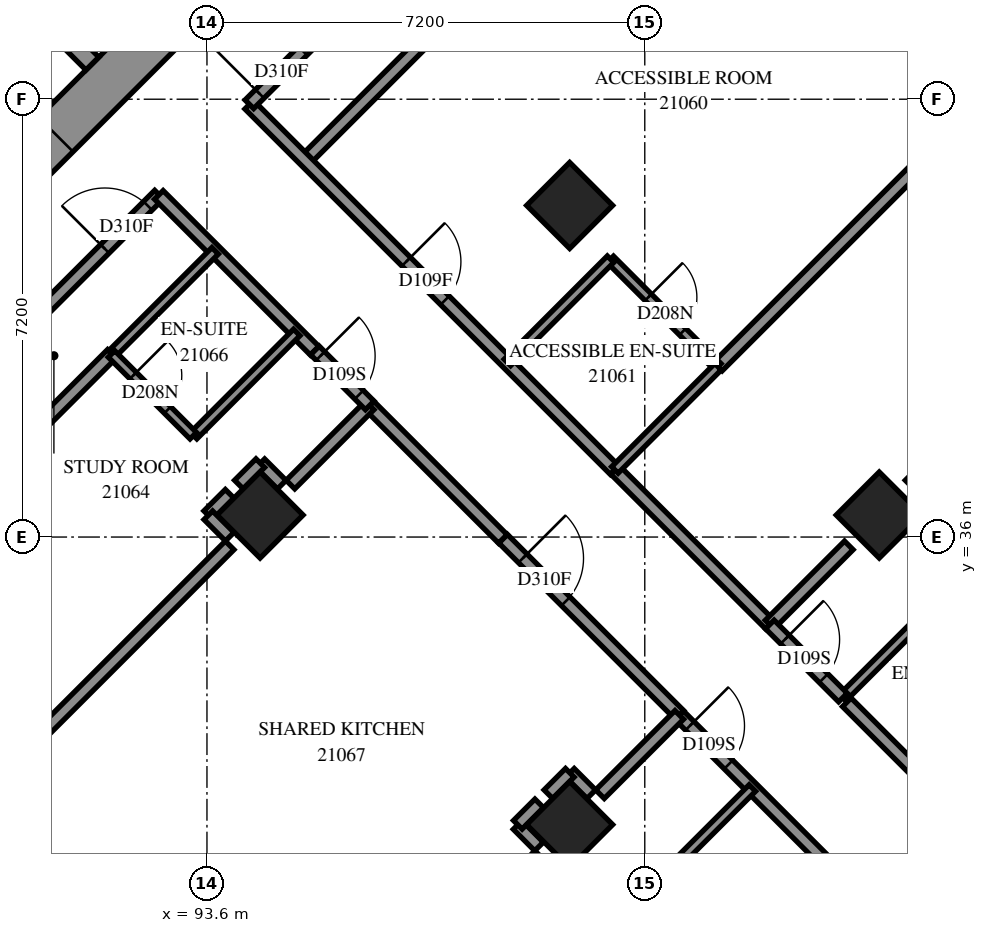
"""IFC4 building model, lengths in metres.
Left out: names, types, materials, properties, quantities, classifications, styles, units other than length and angle.
Written with IfcOpenShell. Run it as: python <this file> out.ifc"""

import sys

from ifc_helpers import new_model, si_unit, direction, frame, frame_2d, origin, origin_2d, place, context, subcontext, project, spatial, rectangle, extrude, element, fill, save


model = new_model("IFC4")
c1 = context("Model", 3, precision=1e-05, world=origin(), true_north=direction((0.0, 1.0)))
c2 = subcontext(c1, "Body", "Model", "MODEL_VIEW")
j1 = project(units=[si_unit("LENGTHUNIT", "METRE"), si_unit("PLANEANGLEUNIT", "RADIAN")], contexts=[c1])
p1 = place(None, origin())
s1 = spatial("IfcSite", under=j1, at=p1, CompositionType="ELEMENT")
p2 = place(p1, origin())
s2 = spatial("IfcBuilding", under=s1, at=p2, CompositionType="ELEMENT")
p3 = place(p2, frame((0.0, 0.0, 81.2)))
s3 = spatial("IfcBuildingStorey", under=s2, at=p3, CompositionType="ELEMENT", Elevation=81.2)
for number, where, z_axis, x_axis in (
    (1, (99.565, 41.453, 0.0), (0.0, 0.0, 1.0), (0.707, -0.707, 0.0)),
    (2, (94.474, 36.362, 0.0), (0.0, 0.0, 1.0), (0.707, -0.707, 0.0)),
    (3, (104.656, 36.362, 0.0), (0.0, 0.0, 1.0), (0.707, -0.707, 0.0)),
    (4, (99.565, 31.271, 0.0), (0.0, 0.0, 1.0), (0.707, -0.707, 0.0)),
):
    element("IfcColumn", number, at=place(p3, frame(where, z_axis=z_axis, x_axis=x_axis)), inside=s3, PredefinedType="COLUMN", context=c2, shape_type="SweptSolid", body=[
        extrude(rectangle(XDim=1.0, YDim=1.0, at=origin_2d()), origin(), (0.0, 0.0, 1.0), 3.1),
    ])
p4 = place(p3, frame((87.12, 38.625, -0.3), z_axis=(0.0, 0.0, 1.0), x_axis=(0.7071067812, 0.7071067812, 0.0)))
e5 = element("IfcWall", 5, at=p4, inside=s3, PredefinedType="SHEAR", context=c2, shape_type="SweptSolid", body=[
    extrude(rectangle(XDim=14.4, YDim=0.8, at=frame_2d((7.2, 0.0))), origin(), (0.0, 0.0, 1.0), 2.7),
])
p5 = place(p4, frame((4.55, 0.0, 0.3)))
e6 = element("IfcOpeningElement", 6, at=p5, cuts=e5, PredefinedType="OPENING", context=c2, shape_type="SweptSolid", body=[
    extrude(rectangle(XDim=1.1, YDim=2.1, at=frame_2d((0.55, 1.05))), frame((0.0, 0.41, 0.0), z_axis=(0.0, -1.0, 0.0), x_axis=(1.0, 0.0, 0.0)), (0.0, 0.0, 1.0), 0.82),
])
p6 = place(p4, frame((11.35, 0.0, 0.3)))
e7 = element("IfcOpeningElement", 7, at=p6, cuts=e5, PredefinedType="OPENING", context=c2, shape_type="SweptSolid", body=[
    extrude(rectangle(XDim=1.1, YDim=2.1, at=frame_2d((0.55, 1.05))), frame((0.0, 0.41, 0.0), z_axis=(0.0, -1.0, 0.0), x_axis=(1.0, 0.0, 0.0)), (0.0, 0.0, 1.0), 0.82),
])
p7 = place(p3, frame((81.534, 53.969, 0.0), z_axis=(0.0, 0.0, 1.0), x_axis=(0.707103309, -0.7071102534, 0.0)))
e8 = element("IfcWall", 8, at=p7, inside=s3, PredefinedType="SOLIDWALL", context=c2, shape_type="SweptSolid", body=[
    extrude(rectangle(XDim=14.4, YDim=0.3, at=frame_2d((7.2, 0.0))), origin(), (0.0, 0.0, 1.0), 3.1),
])
p8 = place(p7, frame((12.05, 0.0, 0.0)))
e9 = element("IfcOpeningElement", 9, at=p8, cuts=e8, PredefinedType="OPENING", context=c2, shape_type="SweptSolid", body=[
    extrude(rectangle(XDim=1.1, YDim=2.1, at=frame_2d((0.55, 1.05))), frame((0.0, 0.16, 0.0), z_axis=(0.0, -1.0, 0.0), x_axis=(1.0, 0.0, 0.0)), (0.0, 0.0, 1.0), 0.32),
])
p9 = place(p3, frame((95.215, 42.197, 0.0), z_axis=(0.0, 0.0, 1.0), x_axis=(0.7071114855, 0.7071020769, 0.0)))
e10 = element("IfcWall", 10, at=p9, inside=s3, PredefinedType="PARTITIONING", context=c2, shape_type="SweptSolid", body=[
    extrude(rectangle(XDim=10.629, YDim=0.2, at=frame_2d((5.314, 0.0))), origin(), (0.0, 0.0, 1.0), 3.1),
])
p10 = place(p3, frame((94.294, 43.111, 0.0), z_axis=(0.0, 0.0, 1.0), x_axis=(0.7071067812, -0.7071067812, 0.0)))
e11 = element("IfcWall", 11, at=p10, inside=s3, PredefinedType="PARTITIONING", context=c2, shape_type="SweptSolid", body=[
    extrude(rectangle(XDim=8.499, YDim=0.2, at=frame_2d((4.25, 0.0))), origin(), (0.0, 0.0, 1.0), 3.1),
])
p11 = place(p10, frame((3.651, 0.0, 0.0)))
e12 = element("IfcOpeningElement", 12, at=p11, cuts=e11, PredefinedType="OPENING", context=c2, shape_type="SweptSolid", body=[
    extrude(rectangle(XDim=0.9, YDim=2.1, at=frame_2d((0.45, 1.05))), frame((0.0, 0.11, 0.0), z_axis=(0.0, -1.0, 0.0), x_axis=(1.0, 0.0, 0.0)), (0.0, 0.0, 1.0), 0.22),
])
p12 = place(p3, frame((86.835, 35.655, 0.0), z_axis=(0.0, 0.0, 1.0), x_axis=(0.7071067812, 0.7071067812, 0.0)))
e13 = element("IfcWall", 13, at=p12, inside=s3, PredefinedType="PARTITIONING", context=c2, shape_type="SweptSolid", body=[
    extrude(rectangle(XDim=8.451, YDim=0.2, at=frame_2d((4.226, 0.0))), origin(), (0.0, 0.0, 1.0), 3.1),
])
p13 = place(p12, frame((7.192, 0.0, 0.0)))
e14 = element("IfcOpeningElement", 14, at=p13, cuts=e13, PredefinedType="OPENING", context=c2, shape_type="SweptSolid", body=[
    extrude(rectangle(XDim=1.0, YDim=2.1, at=frame_2d((0.5, 1.05))), frame((0.0, 0.11, 0.0), z_axis=(0.0, -1.0, 0.0), x_axis=(1.0, 0.0, 0.0)), (0.0, 0.0, 1.0), 0.22),
])
p14 = place(p3, frame((94.297, 43.117, 0.0), z_axis=(0.0, 0.0, 1.0), x_axis=(0.7071067812, 0.7071067812, 0.0)))
e15 = element("IfcWall", 15, at=p14, inside=s3, PredefinedType="PARTITIONING", context=c2, shape_type="SweptSolid", body=[
    extrude(rectangle(XDim=8.448, YDim=0.2, at=frame_2d((4.224, 0.0))), origin(), (0.0, 0.0, 1.0), 3.1),
])
p15 = place(p14, frame((0.242, 0.0, 0.0)))
e16 = element("IfcOpeningElement", 16, at=p15, cuts=e15, PredefinedType="OPENING", context=c2, shape_type="SweptSolid", body=[
    extrude(rectangle(XDim=1.0, YDim=2.1, at=frame_2d((0.5, 1.05))), frame((0.0, 0.11, 0.0), z_axis=(0.0, -1.0, 0.0), x_axis=(1.0, 0.0, 0.0)), (0.0, 0.0, 1.0), 0.22),
])
p16 = place(p3, frame((102.002, 38.804, 0.0), z_axis=(0.0, 0.0, 1.0), x_axis=(0.7072398927, 0.7069736446, 0.0)))
e17 = element("IfcWall", 17, at=p16, inside=s3, PredefinedType="PARTITIONING", context=c2, shape_type="SweptSolid", body=[
    extrude(rectangle(XDim=8.263, YDim=0.2, at=frame_2d((4.131, 0.0))), origin(), (0.0, 0.0, 1.0), 3.1),
])
p17 = place(p3, frame((86.351, 33.325, 0.0), z_axis=(0.0, 0.0, 1.0), x_axis=(0.7069824066, 0.7072311339, 0.0)))
e18 = element("IfcWall", 18, at=p17, inside=s3, PredefinedType="PARTITIONING", context=c2, shape_type="SweptSolid", body=[
    extrude(rectangle(XDim=8.041, YDim=0.2, at=frame_2d((4.021, 0.0))), origin(), (0.0, 0.0, 1.0), 3.1),
])
p18 = place(p3, frame((101.365, 33.071, 0.0), z_axis=(0.0, 0.0, 1.0), x_axis=(0.7071067812, -0.7071067812, 0.0)))
e19 = element("IfcWall", 19, at=p18, inside=s3, PredefinedType="PARTITIONING", context=c2, shape_type="SweptSolid", body=[
    extrude(rectangle(XDim=7.2, YDim=0.2, at=frame_2d((3.6, 0.0))), origin(), (0.0, 0.0, 1.0), 3.1),
])
p19 = place(p18, frame((0.248, 0.0, 0.0)))
e20 = element("IfcOpeningElement", 20, at=p19, cuts=e19, PredefinedType="OPENING", context=c2, shape_type="SweptSolid", body=[
    extrude(rectangle(XDim=0.9, YDim=2.1, at=frame_2d((0.45, 1.05))), frame((0.0, 0.11, 0.0), z_axis=(0.0, -1.0, 0.0), x_axis=(1.0, 0.0, 0.0)), (0.0, 0.0, 1.0), 0.22),
])
p20 = place(p18, frame((5.95, 0.0, 0.0)))
e21 = element("IfcOpeningElement", 21, at=p20, cuts=e19, PredefinedType="OPENING", context=c2, shape_type="SweptSolid", body=[
    extrude(rectangle(XDim=0.9, YDim=2.1, at=frame_2d((0.45, 1.05))), frame((0.0, 0.11, 0.0), z_axis=(0.0, -1.0, 0.0), x_axis=(1.0, 0.0, 0.0)), (0.0, 0.0, 1.0), 0.22),
])
for number, where, z_axis, x_axis in (
    (22, (89.881, 31.771, 0.0), (0.0, 0.0, 1.0), (0.707, 0.707, 0.0)),
    (23, (105.155, 36.863, 0.0), (0.0, 0.0, 1.0), (0.707, 0.707, 0.0)),
):
    element("IfcWall", number, at=place(p3, frame(where, z_axis=z_axis, x_axis=x_axis)), inside=s3, PredefinedType="PARTITIONING", context=c2, shape_type="SweptSolid", body=[
        extrude(rectangle(XDim=5.787, YDim=0.2, at=frame_2d((2.893, 0.0))), origin(), (0.0, 0.0, 1.0), 3.1),
    ])
p21 = place(p3, frame((94.973, 26.681, 0.0), z_axis=(0.0, 0.0, 1.0), x_axis=(0.7071067812, 0.7071067812, 0.0)))
e24 = element("IfcWall", 24, at=p21, inside=s3, PredefinedType="PARTITIONING", context=c2, shape_type="SweptSolid", body=[
    extrude(rectangle(XDim=5.784, YDim=0.2, at=frame_2d((2.892, 0.0))), origin(), (0.0, 0.0, 1.0), 3.1),
])
p22 = place(p3, frame((104.123, 33.282, 0.0), z_axis=(0.0, 0.0, 1.0), x_axis=(0.7071067812, -0.7071067812, 0.0)))
e25 = element("IfcWall", 25, at=p22, inside=s3, PredefinedType="PARTITIONING", context=c2, shape_type="SweptSolid", body=[
    extrude(rectangle(XDim=5.399, YDim=0.2, at=frame_2d((2.7, 0.0))), origin(), (0.0, 0.0, 1.0), 3.1),
])
p23 = place(p22, frame((4.08, 0.0, 0.0)))
e26 = element("IfcOpeningElement", 26, at=p23, cuts=e25, PredefinedType="OPENING", context=c2, shape_type="SweptSolid", body=[
    extrude(rectangle(XDim=0.9, YDim=2.1, at=frame_2d((0.45, 1.05))), frame((0.0, 0.11, 0.0), z_axis=(0.0, -1.0, 0.0), x_axis=(1.0, 0.0, 0.0)), (0.0, 0.0, 1.0), 0.22),
])
p24 = place(p3, frame((98.469, 35.973, 0.0), z_axis=(0.0, 0.0, 1.0), x_axis=(0.7073506531, -0.7068628251, 0.0)))
e27 = element("IfcWall", 27, at=p24, inside=s3, PredefinedType="PARTITIONING", context=c2, shape_type="SweptSolid", body=[
    extrude(rectangle(XDim=4.1, YDim=0.2, at=frame_2d((2.05, 0.0))), origin(), (0.0, 0.0, 1.0), 3.1),
])
p25 = place(p24, frame((0.457, 0.0, 0.0)))
e28 = element("IfcOpeningElement", 28, at=p25, cuts=e27, PredefinedType="OPENING", context=c2, shape_type="SweptSolid", body=[
    extrude(rectangle(XDim=1.0, YDim=2.1, at=frame_2d((0.5, 1.05))), frame((0.0, 0.11, 0.0), z_axis=(0.0, -1.0, 0.0), x_axis=(1.0, 0.0, 0.0)), (0.0, 0.0, 1.0), 0.22),
])
p26 = place(p3, frame((92.809, 41.627, 0.0), z_axis=(0.0, 0.0, 1.0), x_axis=(0.7071067812, -0.7071067812, 0.0)))
e29 = element("IfcWall", 29, at=p26, inside=s3, PredefinedType="PARTITIONING", context=c2, shape_type="SweptSolid", body=[
    extrude(rectangle(XDim=3.623, YDim=0.2, at=frame_2d((1.812, 0.0))), origin(), (0.0, 0.0, 1.0), 3.1),
])
p27 = place(p3, frame((100.31, 37.106, 0.0), z_axis=(0.0, 0.0, 1.0), x_axis=(0.7073845681, -0.7068288851, 0.0)))
e30 = element("IfcWall", 30, at=p27, inside=s3, PredefinedType="PARTITIONING", context=c2, shape_type="SweptSolid", body=[
    extrude(rectangle(XDim=3.599, YDim=0.2, at=frame_2d((1.8, 0.0))), origin(), (0.0, 0.0, 1.0), 3.1),
])
p28 = place(p3, frame((96.274, 38.162, 0.0), z_axis=(0.0, 0.0, 1.0), x_axis=(0.7071067812, -0.7071067812, 0.0)))
e31 = element("IfcWall", 31, at=p28, inside=s3, PredefinedType="PARTITIONING", context=c2, shape_type="SweptSolid", body=[
    extrude(rectangle(XDim=3.1, YDim=0.2, at=frame_2d((1.55, 0.0))), origin(), (0.0, 0.0, 1.0), 3.1),
])
p29 = place(p3, frame((100.233, 40.567, 0.0), z_axis=(0.0, 0.0, 1.0), x_axis=(0.7071067812, -0.7071067812, 0.0)))
e32 = element("IfcWall", 32, at=p29, inside=s3, PredefinedType="PARTITIONING", context=c2, shape_type="SweptSolid", body=[
    extrude(rectangle(XDim=2.5, YDim=0.15, at=frame_2d((1.25, 0.0))), origin(), (0.0, 0.0, 1.0), 3.1),
])
p30 = place(p29, frame((0.883, 0.0, 0.0)))
e33 = element("IfcOpeningElement", 33, at=p30, cuts=e32, PredefinedType="OPENING", context=c2, shape_type="SweptSolid", body=[
    extrude(rectangle(XDim=0.8, YDim=2.1, at=frame_2d((0.4, 1.05))), frame((0.0, 0.085, 0.0), z_axis=(0.0, -1.0, 0.0), x_axis=(1.0, 0.0, 0.0)), (0.0, 0.0, 1.0), 0.17),
])
p31 = place(p3, frame((100.871, 30.175, 0.0), z_axis=(0.0, 0.0, 1.0), x_axis=(0.7071067812, 0.7071067812, 0.0)))
e34 = element("IfcWall", 34, at=p31, inside=s3, PredefinedType="PARTITIONING", context=c2, shape_type="SweptSolid", body=[
    extrude(rectangle(XDim=2.401, YDim=0.15, at=frame_2d((1.201, 0.0))), origin(), (0.0, 0.0, 1.0), 3.1),
])
for number, where, z_axis, x_axis in (
    (35, (92.037, 39.011, 0.0), (0.0, 0.0, 1.0), (0.708, 0.707, 0.0)),
    (36, (93.381, 37.667, 0.0), (0.0, 0.0, 1.0), (0.707, 0.708, 0.0)),
    (37, (98.541, 38.871, 0.0), (0.0, 0.0, 1.0), (0.707, 0.708, 0.0)),
    (38, (100.308, 37.103, 0.0), (0.0, 0.0, 1.0), (0.707, 0.708, 0.0)),
):
    element("IfcWall", number, at=place(p3, frame(where, z_axis=z_axis, x_axis=x_axis)), inside=s3, PredefinedType="PARTITIONING", context=c2, shape_type="SweptSolid", body=[
        extrude(rectangle(XDim=2.4, YDim=0.15, at=frame_2d((1.2, 0.0))), origin(), (0.0, 0.0, 1.0), 3.1),
    ])
p32 = place(p3, frame((104.055, 33.359, 0.0), z_axis=(0.0, 0.0, 1.0), x_axis=(0.7071067812, 0.7071067812, 0.0)))
e39 = element("IfcWall", 39, at=p32, inside=s3, PredefinedType="PARTITIONING", context=c2, shape_type="SweptSolid", body=[
    extrude(rectangle(XDim=2.398, YDim=0.15, at=frame_2d((1.199, 0.0))), origin(), (0.0, 0.0, 1.0), 3.1),
])
p33 = place(p3, frame((92.031, 39.011, 0.0), z_axis=(0.0, 0.0, 1.0), x_axis=(0.7071067812, -0.7071067812, 0.0)))
e40 = element("IfcWall", 40, at=p33, inside=s3, PredefinedType="PARTITIONING", context=c2, shape_type="SweptSolid", body=[
    extrude(rectangle(XDim=1.901, YDim=0.15, at=frame_2d((0.95, 0.0))), origin(), (0.0, 0.0, 1.0), 3.1),
])
p34 = place(p33, frame((0.502, 0.0, 0.0)))
e41 = element("IfcOpeningElement", 41, at=p34, cuts=e40, PredefinedType="OPENING", context=c2, shape_type="SweptSolid", body=[
    extrude(rectangle(XDim=0.8, YDim=2.1, at=frame_2d((0.4, 1.05))), frame((0.0, 0.085, 0.0), z_axis=(0.0, -1.0, 0.0), x_axis=(1.0, 0.0, 0.0)), (0.0, 0.0, 1.0), 0.17),
])
p35 = place(p3, frame((100.063, 31.771, 0.0), z_axis=(0.0, 0.0, 1.0), x_axis=(0.7071067812, 0.7071067812, 0.0)))
e42 = element("IfcWall", 42, at=p35, inside=s3, PredefinedType="PARTITIONING", context=c2, shape_type="SweptSolid", body=[
    extrude(rectangle(XDim=1.844, YDim=0.2, at=frame_2d((0.922, 0.0))), origin(), (0.0, 0.0, 1.0), 3.1),
])
for number, where, z_axis, x_axis in (
    (43, (94.973, 36.863, 0.0), (0.0, 0.0, 1.0), (0.707, 0.707, 0.0)),
    (44, (102.853, 34.561, 0.0), (0.0, 0.0, 1.0), (0.707, 0.707, 0.0)),
):
    element("IfcWall", number, at=place(p3, frame(where, z_axis=z_axis, x_axis=x_axis)), inside=s3, PredefinedType="PARTITIONING", context=c2, shape_type="SweptSolid", body=[
        extrude(rectangle(XDim=1.841, YDim=0.2, at=frame_2d((0.921, 0.0))), origin(), (0.0, 0.0, 1.0), 3.1),
    ])
p36 = place(p3, frame((102.857, 34.563, 0.0), z_axis=(0.0, 0.0, 1.0), x_axis=(0.7071067812, -0.7071067812, 0.0)))
e45 = element("IfcWall", 45, at=p36, inside=s3, PredefinedType="PARTITIONING", context=c2, shape_type="SweptSolid", body=[
    extrude(rectangle(XDim=1.7, YDim=0.2, at=frame_2d((0.85, 0.0))), origin(), (0.0, 0.0, 1.0), 3.1),
])
p37 = place(p36, frame((0.35, 0.0, 0.0)))
e46 = element("IfcOpeningElement", 46, at=p37, cuts=e45, PredefinedType="OPENING", context=c2, shape_type="SweptSolid", body=[
    extrude(rectangle(XDim=0.9, YDim=2.1, at=frame_2d((0.45, 1.05))), frame((0.0, 0.11, 0.0), z_axis=(0.0, -1.0, 0.0), x_axis=(1.0, 0.0, 0.0)), (0.0, 0.0, 1.0), 0.22),
])
p38 = place(p3, frame((95.375, 39.069, 0.0), z_axis=(0.0, 0.0, 1.0), x_axis=(0.7063232841, -0.7078894111, 0.0)))
e47 = element("IfcWall", 47, at=p38, inside=s3, PredefinedType="PARTITIONING", context=c2, shape_type="SweptSolid", body=[
    extrude(rectangle(XDim=1.277, YDim=0.2, at=frame_2d((0.638, 0.0))), origin(), (0.0, 0.0, 1.0), 3.1),
])
p39 = place(p38, frame((0.129, 0.0, 0.0)))
e48 = element("IfcOpeningElement", 48, at=p39, cuts=e47, PredefinedType="OPENING", context=c2, shape_type="SweptSolid", body=[
    extrude(rectangle(XDim=0.9, YDim=2.1, at=frame_2d((0.45, 1.05))), frame((0.0, 0.11, 0.0), z_axis=(0.0, -1.0, 0.0), x_axis=(1.0, 0.0, 0.0)), (0.0, 0.0, 1.0), 0.22),
])
p40 = place(p3, frame((98.709, 31.265, 0.0), z_axis=(0.0, 0.0, 1.0), x_axis=(0.7051008166, -0.7091070712, 0.0)))
e49 = element("IfcWall", 49, at=p40, inside=s3, PredefinedType="PARTITIONING", context=c2, shape_type="SweptSolid", body=[
    extrude(rectangle(XDim=0.499, YDim=0.2, at=frame_2d((0.25, 0.0))), origin(), (0.0, 0.0, 1.0), 3.1),
])
for number, where, z_axis, x_axis in (
    (50, (99.569, 32.123, 0.0), (0.0, 0.0, 1.0), (0.707, -0.707, 0.0)),
    (51, (93.621, 36.359, 0.0), (0.0, 0.0, 1.0), (0.707, 0.707, 0.0)),
    (52, (99.215, 31.771, 0.0), (0.0, 0.0, 1.0), (0.707, 0.707, 0.0)),
    (53, (94.478, 37.214, 0.0), (0.0, 0.0, 1.0), (0.707, -0.707, 0.0)),
    (54, (94.125, 36.863, 0.0), (0.0, 0.0, 1.0), (0.707, 0.707, 0.0)),
    (55, (98.712, 31.268, 0.0), (0.0, 0.0, 1.0), (0.707, 0.707, 0.0)),
    (56, (93.622, 36.358, 0.0), (0.0, 0.0, 1.0), (0.707, -0.707, 0.0)),
):
    element("IfcWall", number, at=place(p3, frame(where, z_axis=z_axis, x_axis=x_axis)), inside=s3, PredefinedType="PARTITIONING", context=c2, shape_type="SweptSolid", body=[
        extrude(rectangle(XDim=0.498, YDim=0.2, at=frame_2d((0.249, 0.0))), origin(), (0.0, 0.0, 1.0), 3.1),
    ])
p41 = place(p5, origin())
e57 = element("IfcDoor", 57, at=p41, inside=s3, OperationType="DOUBLE_DOOR_SINGLE_SWING", PredefinedType="DOOR", context=c2, shape_type="SweptSolid", body=[
    extrude(rectangle(XDim=1.1, YDim=2.1, at=frame_2d((0.55, 1.05))), frame((0.0, 0.025, 0.0), z_axis=(0.0, -1.0, 0.0), x_axis=(1.0, 0.0, 0.0)), (0.0, 0.0, 1.0), 0.05),
])
fill(e6, e57)
p42 = place(p15, origin())
e58 = element("IfcDoor", 58, at=p42, inside=s3, OperationType="SINGLE_SWING_LEFT", PredefinedType="DOOR", context=c2, shape_type="SweptSolid", body=[
    extrude(rectangle(XDim=1.0, YDim=2.1, at=frame_2d((0.5, 1.05))), frame((0.0, 0.025, 0.0), z_axis=(0.0, -1.0, 0.0), x_axis=(1.0, 0.0, 0.0)), (0.0, 0.0, 1.0), 0.05),
])
fill(e16, e58)
p43 = place(p11, origin())
e59 = element("IfcDoor", 59, at=p43, inside=s3, OperationType="SINGLE_SWING_RIGHT", PredefinedType="DOOR", context=c2, shape_type="SweptSolid", body=[
    extrude(rectangle(XDim=0.9, YDim=2.1, at=frame_2d((0.45, 1.05))), frame((0.0, 0.025, 0.0), z_axis=(0.0, -1.0, 0.0), x_axis=(1.0, 0.0, 0.0)), (0.0, 0.0, 1.0), 0.05),
])
fill(e12, e59)
p44 = place(p30, origin())
e60 = element("IfcDoor", 60, at=p44, inside=s3, OperationType="SINGLE_SWING_RIGHT", PredefinedType="DOOR", context=c2, shape_type="SweptSolid", body=[
    extrude(rectangle(XDim=0.8, YDim=2.1, at=frame_2d((0.4, 1.05))), frame((0.0, 0.025, 0.0), z_axis=(0.0, -1.0, 0.0), x_axis=(1.0, 0.0, 0.0)), (0.0, 0.0, 1.0), 0.05),
])
fill(e33, e60)
p45 = place(p37, origin())
e61 = element("IfcDoor", 61, at=p45, inside=s3, OperationType="SINGLE_SWING_LEFT", PredefinedType="DOOR", context=c2, shape_type="SweptSolid", body=[
    extrude(rectangle(XDim=0.9, YDim=2.1, at=frame_2d((0.45, 1.05))), frame((0.0, 0.025, 0.0), z_axis=(0.0, -1.0, 0.0), x_axis=(1.0, 0.0, 0.0)), (0.0, 0.0, 1.0), 0.05),
])
fill(e46, e61)
p46 = place(p13, origin())
e62 = element("IfcDoor", 62, at=p46, inside=s3, OperationType="SINGLE_SWING_RIGHT", PredefinedType="DOOR", context=c2, shape_type="SweptSolid", body=[
    extrude(rectangle(XDim=1.0, YDim=2.1, at=frame_2d((0.5, 1.05))), frame((0.0, 0.025, 0.0), z_axis=(0.0, -1.0, 0.0), x_axis=(1.0, 0.0, 0.0)), (0.0, 0.0, 1.0), 0.05),
])
fill(e14, e62)
p47 = place(p39, origin())
e63 = element("IfcDoor", 63, at=p47, inside=s3, OperationType="SINGLE_SWING_LEFT", PredefinedType="DOOR", context=c2, shape_type="SweptSolid", body=[
    extrude(rectangle(XDim=0.9, YDim=2.1, at=frame_2d((0.45, 1.05))), frame((0.0, 0.025, 0.0), z_axis=(0.0, -1.0, 0.0), x_axis=(1.0, 0.0, 0.0)), (0.0, 0.0, 1.0), 0.05),
])
fill(e48, e63)
p48 = place(p34, origin())
e64 = element("IfcDoor", 64, at=p48, inside=s3, OperationType="SINGLE_SWING_RIGHT", PredefinedType="DOOR", context=c2, shape_type="SweptSolid", body=[
    extrude(rectangle(XDim=0.8, YDim=2.1, at=frame_2d((0.4, 1.05))), frame((0.0, 0.025, 0.0), z_axis=(0.0, -1.0, 0.0), x_axis=(1.0, 0.0, 0.0)), (0.0, 0.0, 1.0), 0.05),
])
fill(e41, e64)
p49 = place(p25, origin())
e65 = element("IfcDoor", 65, at=p49, inside=s3, OperationType="SINGLE_SWING_RIGHT", PredefinedType="DOOR", context=c2, shape_type="SweptSolid", body=[
    extrude(rectangle(XDim=1.0, YDim=2.1, at=frame_2d((0.5, 1.05))), frame((0.0, 0.025, 0.0), z_axis=(0.0, -1.0, 0.0), x_axis=(1.0, 0.0, 0.0)), (0.0, 0.0, 1.0), 0.05),
])
fill(e28, e65)
p50 = place(p19, origin())
e66 = element("IfcDoor", 66, at=p50, inside=s3, OperationType="SINGLE_SWING_RIGHT", PredefinedType="DOOR", context=c2, shape_type="SweptSolid", body=[
    extrude(rectangle(XDim=0.9, YDim=2.1, at=frame_2d((0.45, 1.05))), frame((0.0, 0.025, 0.0), z_axis=(0.0, -1.0, 0.0), x_axis=(1.0, 0.0, 0.0)), (0.0, 0.0, 1.0), 0.05),
])
fill(e20, e66)
save(model, sys.argv[1])
